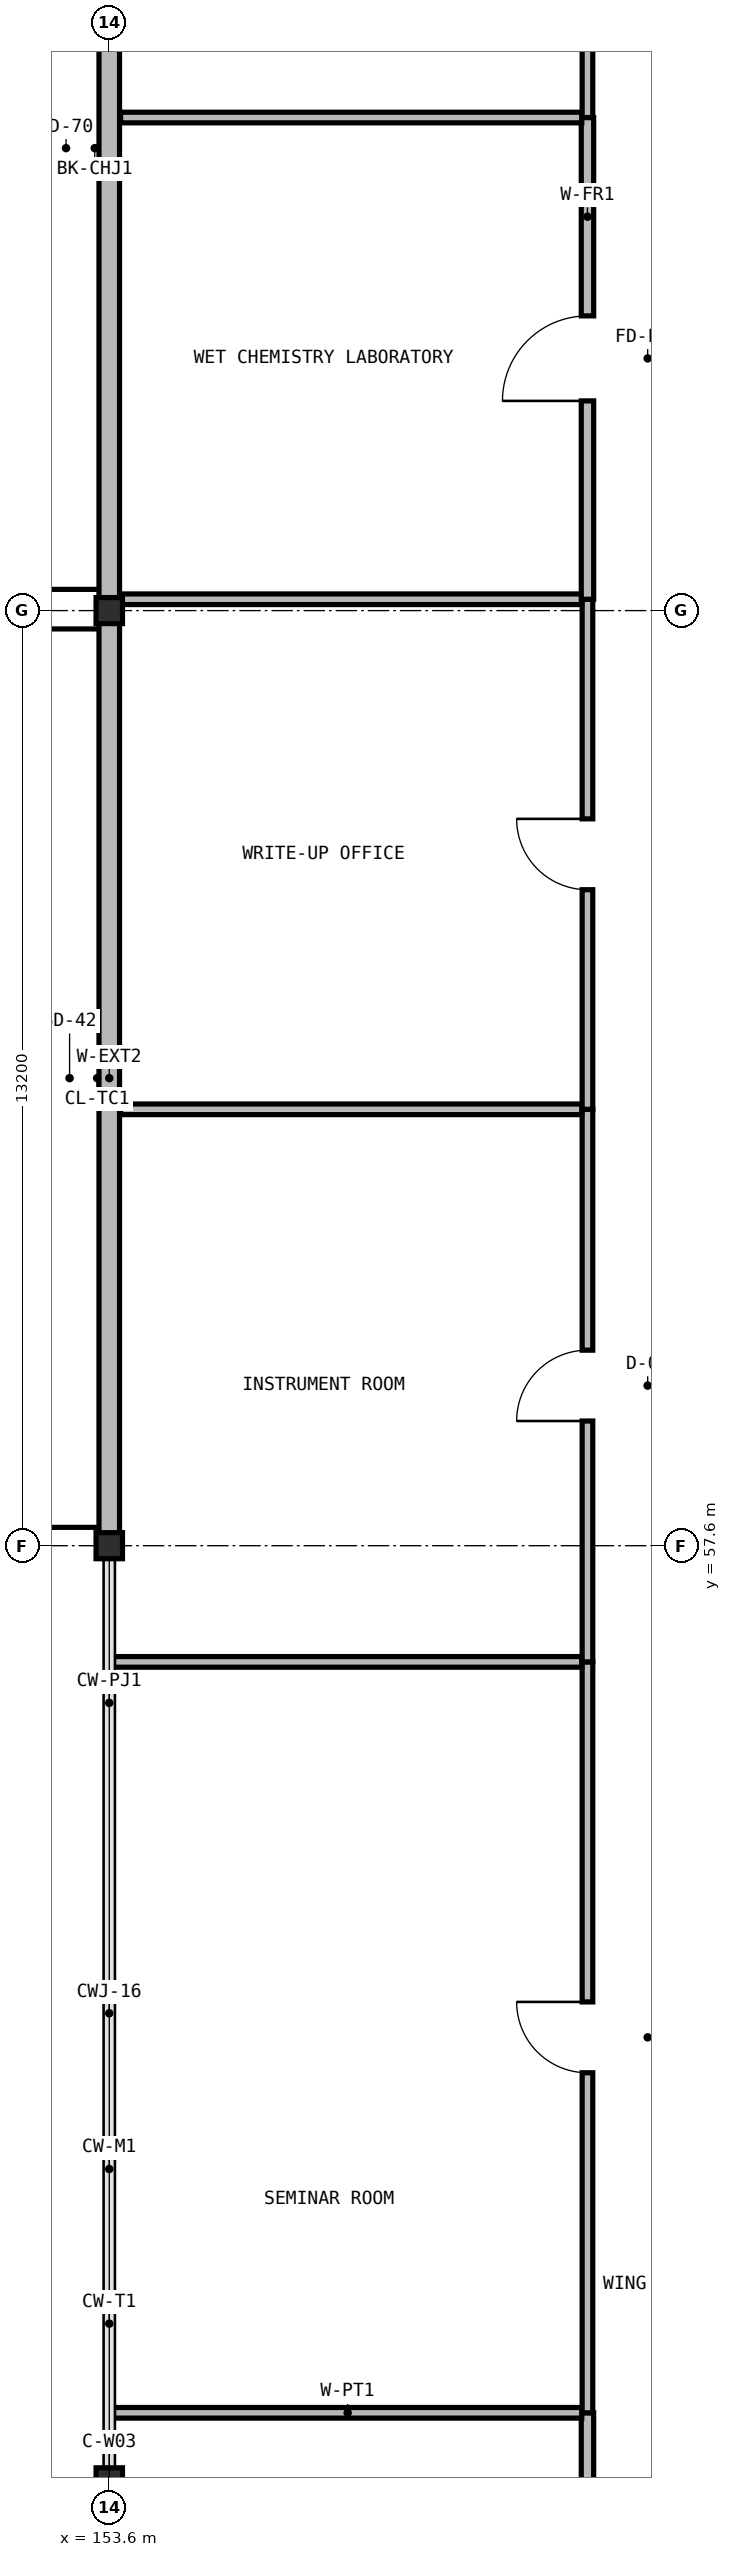
"""IFC4 building model, lengths in metres.
Left out: names, types, materials, properties, quantities, classifications, styles, units other than length and angle.
Written with IfcOpenShell. Run it as: python <this file> out.ifc"""

import sys

from ifc_helpers import new_model, si_unit, direction, frame, frame_2d, origin, origin_2d, place, context, subcontext, project, spatial, rectangle, i_section, extrude, element, fill, save


model = new_model("IFC4")
c1 = context("Model", 3, precision=1e-05, world=origin(), true_north=direction((0.0, 1.0)))
c2 = subcontext(c1, "Body", "Model", "MODEL_VIEW")
j1 = project(units=[si_unit("LENGTHUNIT", "METRE"), si_unit("PLANEANGLEUNIT", "RADIAN")], contexts=[c1])
p1 = place(None, origin())
s1 = spatial("IfcSite", under=j1, at=p1, CompositionType="ELEMENT")
p2 = place(p1, origin())
s2 = spatial("IfcBuilding", under=s1, at=p2, CompositionType="ELEMENT")
p3 = place(p2, frame((0.0, 0.0, 23.45)))
s3 = spatial("IfcBuildingStorey", under=s2, at=p3, CompositionType="ELEMENT", Elevation=23.45)
for number, where, z_axis, x_axis in (
    (1, (153.6, 44.4, 0.0), (0.0, 0.0, 1.0), (1.0, 0.0, 0.0)),
    (2, (153.6, 57.6, 0.0), (0.0, 0.0, 1.0), (1.0, 0.0, 0.0)),
    (3, (153.6, 70.8, 0.0), (0.0, 0.0, 1.0), (1.0, 0.0, 0.0)),
):
    element("IfcColumn", number, at=place(p3, frame(where, z_axis=z_axis, x_axis=x_axis)), inside=s3, PredefinedType="COLUMN", context=c2, shape_type="SweptSolid", body=[
        extrude(i_section(OverallWidth=0.373, OverallDepth=0.368, WebThickness=0.017, FlangeThickness=0.027, at=origin_2d()), origin(), (0.0, 0.0, 1.0), 4.55),
    ])
p4 = place(p3, frame((153.6, 57.604, 0.0), z_axis=(0.0, 0.0, 1.0), x_axis=(0.0, 1.0, 0.0)))
e4 = element("IfcWall", 4, at=p4, inside=s3, PredefinedType="SOLIDWALL", context=c2, shape_type="SweptSolid", body=[
    extrude(rectangle(XDim=13.192, YDim=0.29, at=frame_2d((6.596, 0.0))), origin(), (0.0, 0.0, 1.0), 3.757),
])
p5 = place(p3, frame((153.6, 70.804, 0.0), z_axis=(0.0, 0.0, 1.0), x_axis=(0.0, 1.0, 0.0)))
e5 = element("IfcWall", 5, at=p5, inside=s3, PredefinedType="SOLIDWALL", context=c2, shape_type="SweptSolid", body=[
    extrude(rectangle(XDim=13.047, YDim=0.29, at=frame_2d((6.523, 0.0))), origin(), (0.0, 0.0, 1.0), 3.695),
])
p6 = place(p3, frame((160.35, 38.56, 0.0), z_axis=(0.0, 0.0, 1.0), x_axis=(0.0, 1.0, 0.0)))
e6 = element("IfcWall", 6, at=p6, inside=s3, PredefinedType="PARTITIONING", context=c2, shape_type="SweptSolid", body=[
    extrude(rectangle(XDim=6.8, YDim=0.175, at=frame_2d((3.4, 0.0))), origin(), (0.0, 0.0, 1.0), 4.3),
])
p7 = place(p6, frame((2.8, 0.0, 0.0)))
e7 = element("IfcOpeningElement", 7, at=p7, cuts=e6, PredefinedType="OPENING", context=c2, shape_type="SweptSolid", body=[
    extrude(rectangle(XDim=1.2, YDim=2.2, at=frame_2d((0.6, 1.1))), frame((0.0, 0.097, 0.0), z_axis=(0.0, -1.0, 0.0), x_axis=(1.0, 0.0, 0.0)), (0.0, 0.0, 1.0), 0.195),
])
p8 = place(p3, frame((153.66, 45.36, 0.0), z_axis=(0.0, 0.0, 1.0), x_axis=(1.0, 0.0, 0.0)))
e8 = element("IfcWall", 8, at=p8, inside=s3, PredefinedType="PARTITIONING", context=c2, shape_type="SweptSolid", body=[
    extrude(rectangle(XDim=6.61, YDim=0.15, at=frame_2d((3.305, 0.0))), origin(), (0.0, 0.0, 1.0), 4.3),
])
p9 = place(p3, frame((160.35, 45.36, 0.0), z_axis=(0.0, 0.0, 1.0), x_axis=(0.0, 1.0, 0.0)))
e9 = element("IfcWall", 9, at=p9, inside=s3, PredefinedType="PARTITIONING", context=c2, shape_type="SweptSolid", body=[
    extrude(rectangle(XDim=10.6, YDim=0.15, at=frame_2d((5.3, 0.0))), origin(), (0.0, 0.0, 1.0), 4.3),
])
p10 = place(p9, frame((4.8, 0.0, 0.0)))
e10 = element("IfcOpeningElement", 10, at=p10, cuts=e9, PredefinedType="OPENING", context=c2, shape_type="SweptSolid", body=[
    extrude(rectangle(XDim=1.0, YDim=2.2, at=frame_2d((0.5, 1.1))), frame((0.0, 0.085, 0.0), z_axis=(0.0, -1.0, 0.0), x_axis=(1.0, 0.0, 0.0)), (0.0, 0.0, 1.0), 0.17),
])
p11 = place(p3, frame((153.66, 55.96, 0.0), z_axis=(0.0, 0.0, 1.0), x_axis=(1.0, 0.0, 0.0)))
e11 = element("IfcWall", 11, at=p11, inside=s3, PredefinedType="PARTITIONING", context=c2, shape_type="SweptSolid", body=[
    extrude(rectangle(XDim=6.61, YDim=0.15, at=frame_2d((3.305, 0.0))), origin(), (0.0, 0.0, 1.0), 4.3),
])
p12 = place(p3, frame((160.35, 55.96, 0.0), z_axis=(0.0, 0.0, 1.0), x_axis=(0.0, 1.0, 0.0)))
e12 = element("IfcWall", 12, at=p12, inside=s3, PredefinedType="PARTITIONING", context=c2, shape_type="SweptSolid", body=[
    extrude(rectangle(XDim=7.8, YDim=0.15, at=frame_2d((3.9, 0.0))), origin(), (0.0, 0.0, 1.0), 4.3),
])
p13 = place(p12, frame((3.4, 0.0, 0.0)))
e13 = element("IfcOpeningElement", 13, at=p13, cuts=e12, PredefinedType="OPENING", context=c2, shape_type="SweptSolid", body=[
    extrude(rectangle(XDim=1.0, YDim=2.2, at=frame_2d((0.5, 1.1))), frame((0.0, 0.085, 0.0), z_axis=(0.0, -1.0, 0.0), x_axis=(1.0, 0.0, 0.0)), (0.0, 0.0, 1.0), 0.17),
])
p14 = place(p3, frame((153.76, 63.76, 0.0), z_axis=(0.0, 0.0, 1.0), x_axis=(1.0, 0.0, 0.0)))
e14 = element("IfcWall", 14, at=p14, inside=s3, PredefinedType="PARTITIONING", context=c2, shape_type="SweptSolid", body=[
    extrude(rectangle(XDim=6.51, YDim=0.15, at=frame_2d((3.255, 0.0))), origin(), (0.0, 0.0, 1.0), 4.3),
])
p15 = place(p3, frame((160.35, 63.76, 0.0), z_axis=(0.0, 0.0, 1.0), x_axis=(0.0, 1.0, 0.0)))
e15 = element("IfcWall", 15, at=p15, inside=s3, PredefinedType="PARTITIONING", context=c2, shape_type="SweptSolid", body=[
    extrude(rectangle(XDim=7.2, YDim=0.15, at=frame_2d((3.6, 0.0))), origin(), (0.0, 0.0, 1.0), 4.3),
])
p16 = place(p15, frame((3.1, 0.0, 0.0)))
e16 = element("IfcOpeningElement", 16, at=p16, cuts=e15, PredefinedType="OPENING", context=c2, shape_type="SweptSolid", body=[
    extrude(rectangle(XDim=1.0, YDim=2.2, at=frame_2d((0.5, 1.1))), frame((0.0, 0.085, 0.0), z_axis=(0.0, -1.0, 0.0), x_axis=(1.0, 0.0, 0.0)), (0.0, 0.0, 1.0), 0.17),
])
p17 = place(p3, frame((153.76, 70.96, 0.0), z_axis=(0.0, 0.0, 1.0), x_axis=(1.0, 0.0, 0.0)))
e17 = element("IfcWall", 17, at=p17, inside=s3, PredefinedType="PARTITIONING", context=c2, shape_type="SweptSolid", body=[
    extrude(rectangle(XDim=6.51, YDim=0.15, at=frame_2d((3.255, 0.0))), origin(), (0.0, 0.0, 1.0), 3.768),
])
p18 = place(p3, frame((160.35, 70.96, 0.0), z_axis=(0.0, 0.0, 1.0), x_axis=(0.0, 1.0, 0.0)))
e18 = element("IfcWall", 18, at=p18, inside=s3, PredefinedType="PARTITIONING", context=c2, shape_type="SweptSolid", body=[
    extrude(rectangle(XDim=6.8, YDim=0.175, at=frame_2d((3.4, 0.0))), origin(), (0.0, 0.0, 1.0), 4.3),
])
p19 = place(p18, frame((2.8, 0.0, 0.0)))
e19 = element("IfcOpeningElement", 19, at=p19, cuts=e18, PredefinedType="OPENING", context=c2, shape_type="SweptSolid", body=[
    extrude(rectangle(XDim=1.2, YDim=2.2, at=frame_2d((0.6, 1.1))), frame((0.0, 0.097, 0.0), z_axis=(0.0, -1.0, 0.0), x_axis=(1.0, 0.0, 0.0)), (0.0, 0.0, 1.0), 0.195),
])
p20 = place(p3, frame((153.76, 77.76, 0.0), z_axis=(0.0, 0.0, 1.0), x_axis=(1.0, 0.0, 0.0)))
e20 = element("IfcWall", 20, at=p20, inside=s3, PredefinedType="PARTITIONING", context=c2, shape_type="SweptSolid", body=[
    extrude(rectangle(XDim=6.51, YDim=0.15, at=frame_2d((3.255, 0.0))), origin(), (0.0, 0.0, 1.0), 4.3),
])
p21 = place(p3, frame((160.35, 77.76, 0.0), z_axis=(0.0, 0.0, 1.0), x_axis=(0.0, 1.0, 0.0)))
e21 = element("IfcWall", 21, at=p21, inside=s3, PredefinedType="PARTITIONING", context=c2, shape_type="SweptSolid", body=[
    extrude(rectangle(XDim=6.08, YDim=0.15, at=frame_2d((3.04, 0.0))), origin(), (0.0, 0.0, 1.0), 4.3),
])
p22 = place(p21, frame((2.54, 0.0, 0.0)))
e22 = element("IfcOpeningElement", 22, at=p22, cuts=e21, PredefinedType="OPENING", context=c2, shape_type="SweptSolid", body=[
    extrude(rectangle(XDim=1.0, YDim=2.2, at=frame_2d((0.5, 1.1))), frame((0.0, 0.085, 0.0), z_axis=(0.0, -1.0, 0.0), x_axis=(1.0, 0.0, 0.0)), (0.0, 0.0, 1.0), 0.17),
])
p23 = place(p10, origin())
e23 = element("IfcDoor", 23, at=p23, inside=s3, OperationType="SINGLE_SWING_RIGHT", PredefinedType="DOOR", context=c2, shape_type="SweptSolid", body=[
    extrude(rectangle(XDim=1.0, YDim=2.2, at=frame_2d((0.5, 1.1))), frame((0.0, 0.025, 0.0), z_axis=(0.0, -1.0, 0.0), x_axis=(1.0, 0.0, 0.0)), (0.0, 0.0, 1.0), 0.05),
])
fill(e10, e23)
p24 = place(p13, origin())
e24 = element("IfcDoor", 24, at=p24, inside=s3, OperationType="SINGLE_SWING_LEFT", PredefinedType="DOOR", context=c2, shape_type="SweptSolid", body=[
    extrude(rectangle(XDim=1.0, YDim=2.2, at=frame_2d((0.5, 1.1))), frame((0.0, 0.025, 0.0), z_axis=(0.0, -1.0, 0.0), x_axis=(1.0, 0.0, 0.0)), (0.0, 0.0, 1.0), 0.05),
])
fill(e13, e24)
p25 = place(p16, origin())
e25 = element("IfcDoor", 25, at=p25, inside=s3, OperationType="SINGLE_SWING_RIGHT", PredefinedType="DOOR", context=c2, shape_type="SweptSolid", body=[
    extrude(rectangle(XDim=1.0, YDim=2.2, at=frame_2d((0.5, 1.1))), frame((0.0, 0.025, 0.0), z_axis=(0.0, -1.0, 0.0), x_axis=(1.0, 0.0, 0.0)), (0.0, 0.0, 1.0), 0.05),
])
fill(e16, e25)
p26 = place(p19, origin())
e26 = element("IfcDoor", 26, at=p26, inside=s3, OperationType="SINGLE_SWING_LEFT", PredefinedType="DOOR", context=c2, shape_type="SweptSolid", body=[
    extrude(rectangle(XDim=1.2, YDim=2.2, at=frame_2d((0.6, 1.1))), frame((0.0, 0.025, 0.0), z_axis=(0.0, -1.0, 0.0), x_axis=(1.0, 0.0, 0.0)), (0.0, 0.0, 1.0), 0.05),
])
fill(e19, e26)
save(model, sys.argv[1])
